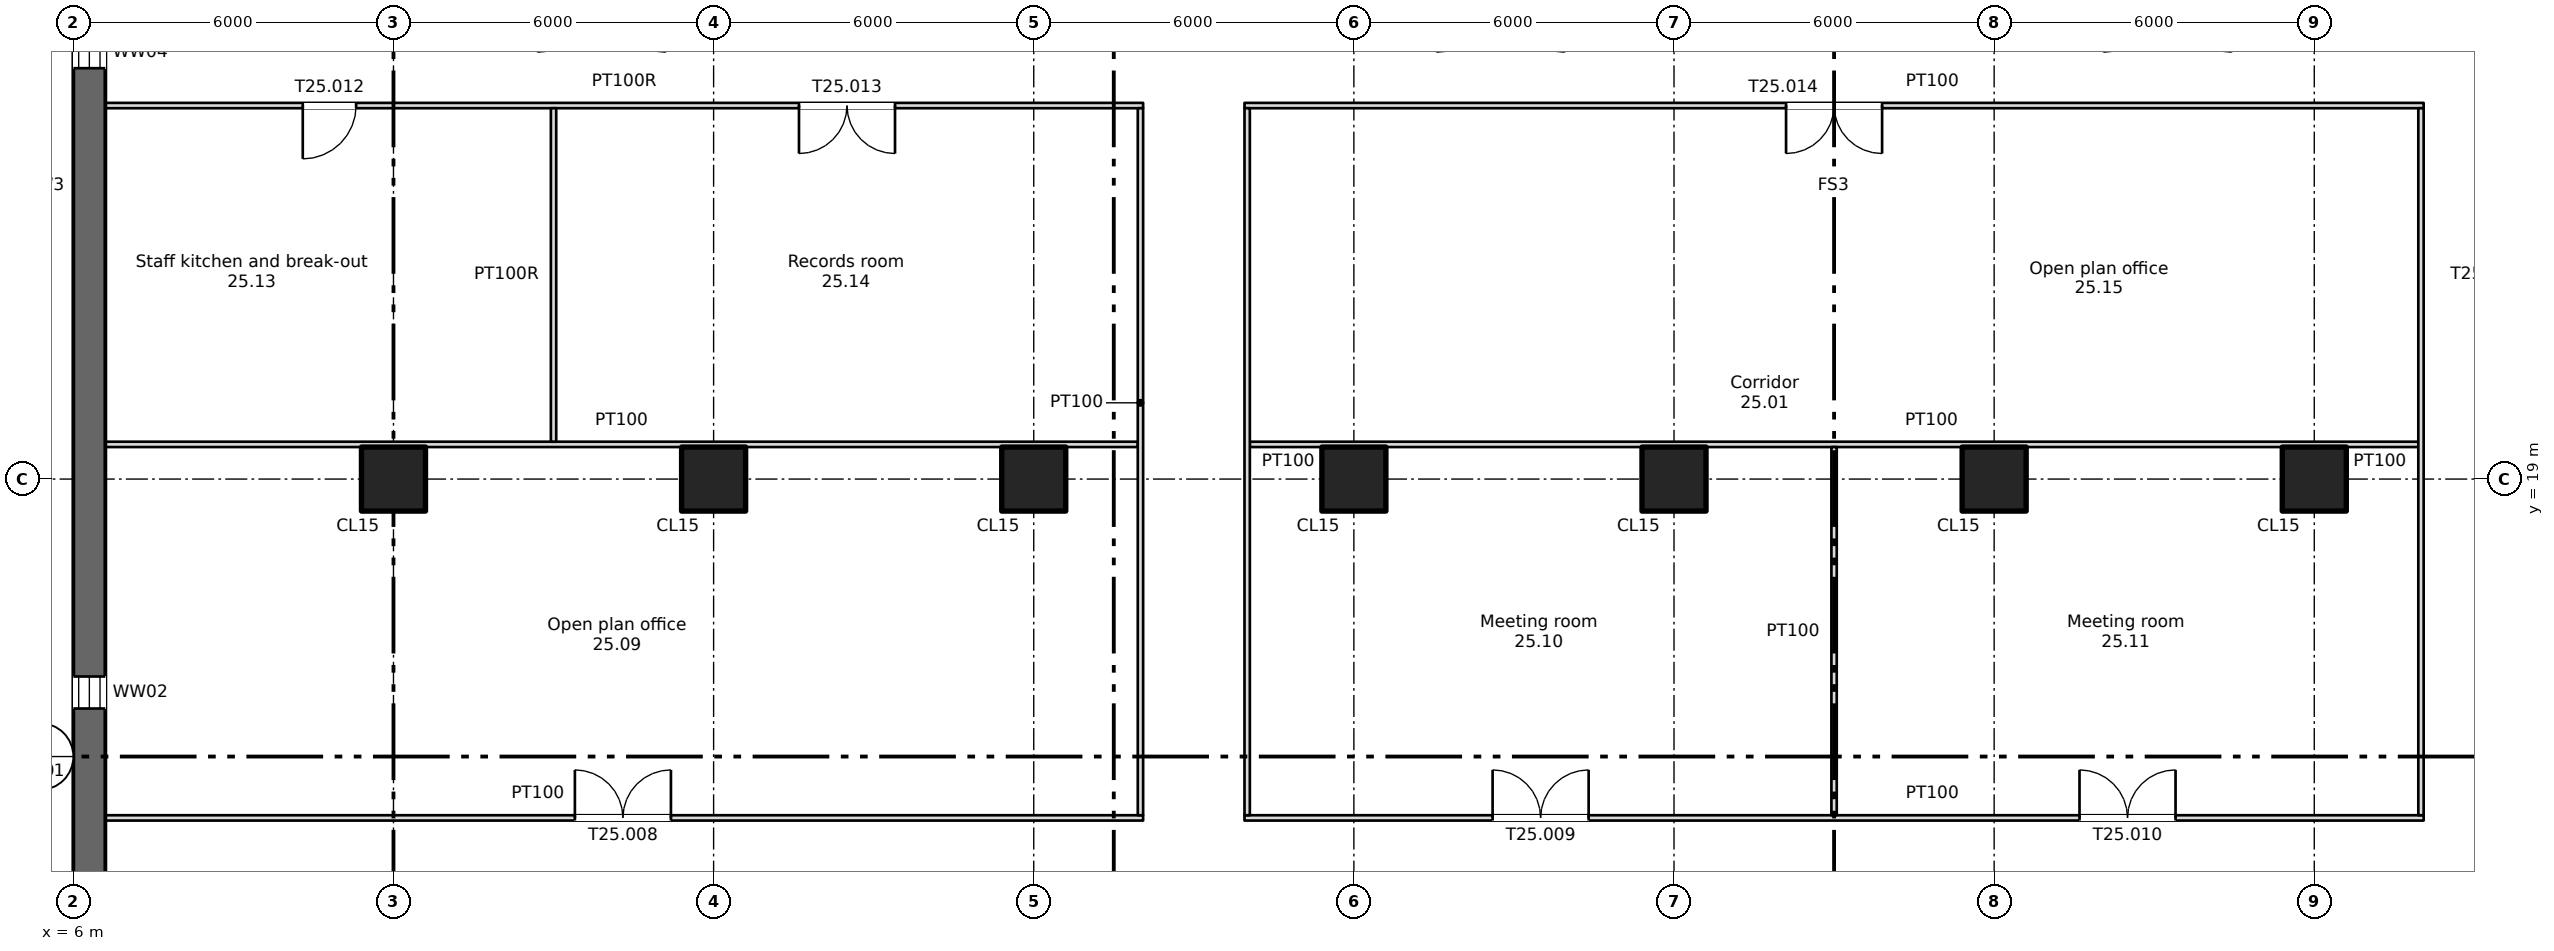
"""IFC4 building model, lengths in metres.
Left out: names, types, materials, properties, quantities, classifications, styles, units other than length and angle.
Written with IfcOpenShell. Run it as: python <this file> out.ifc"""

import sys

from ifc_helpers import new_model, si_unit, direction, frame, frame_2d, origin, origin_2d, place, context, subcontext, project, spatial, rectangle, extrude, element, fill, save


model = new_model("IFC4")
c1 = context("Model", 3, precision=1e-05, world=origin(), true_north=direction((0.0, 1.0)))
c2 = subcontext(c1, "Body", "Model", "MODEL_VIEW")
j1 = project(units=[si_unit("LENGTHUNIT", "METRE"), si_unit("PLANEANGLEUNIT", "RADIAN")], contexts=[c1])
p1 = place(None, origin())
s1 = spatial("IfcSite", under=j1, at=p1, CompositionType="ELEMENT")
p2 = place(p1, origin())
s2 = spatial("IfcBuilding", under=s1, at=p2, CompositionType="ELEMENT")
p3 = place(p2, frame((0.0, 0.0, 170.5)))
s3 = spatial("IfcBuildingStorey", under=s2, at=p3, CompositionType="ELEMENT", Elevation=170.5)
for number, where, z_axis, x_axis in (
    (1, (12.0, 19.0, 0.0), (0.0, 0.0, 1.0), (1.0, 0.0, 0.0)),
    (2, (18.0, 19.0, 0.0), (0.0, 0.0, 1.0), (1.0, 0.0, 0.0)),
    (3, (24.0, 19.0, 0.0), (0.0, 0.0, 1.0), (1.0, 0.0, 0.0)),
    (4, (30.0, 19.0, 0.0), (0.0, 0.0, 1.0), (1.0, 0.0, 0.0)),
    (5, (36.0, 19.0, 0.0), (0.0, 0.0, 1.0), (1.0, 0.0, 0.0)),
    (6, (42.0, 19.0, 0.0), (0.0, 0.0, 1.0), (1.0, 0.0, 0.0)),
    (7, (48.0, 19.0, 0.0), (0.0, 0.0, 1.0), (1.0, 0.0, 0.0)),
):
    element("IfcColumn", number, at=place(p3, frame(where, z_axis=z_axis, x_axis=x_axis)), inside=s3, PredefinedType="COLUMN", context=c2, shape_type="SweptSolid", body=[
        extrude(rectangle(XDim=1.2, YDim=1.2, at=origin_2d()), origin(), (0.0, 0.0, 1.0), 3.35),
    ])
p4 = place(p3, frame((6.3, 7.5, 0.0), z_axis=(0.0, 0.0, 1.0), x_axis=(0.0, 1.0, 0.0)))
e8 = element("IfcWall", 8, at=p4, inside=s3, PredefinedType="SHEAR", context=c2, shape_type="SweptSolid", body=[
    extrude(rectangle(XDim=34.0, YDim=0.6, at=frame_2d((17.0, 0.0))), origin(), (0.0, 0.0, 1.0), 3.35),
])
p5 = place(p4, frame((1.2, 0.0, 0.6)))
e9 = element("IfcOpeningElement", 9, at=p5, cuts=e8, PredefinedType="OPENING", context=c2, shape_type="SweptSolid", body=[
    extrude(rectangle(XDim=0.6, YDim=2.4, at=frame_2d((0.3, 1.2))), frame((0.0, 0.31, 0.0), z_axis=(0.0, -1.0, 0.0), x_axis=(1.0, 0.0, 0.0)), (0.0, 0.0, 1.0), 0.62),
])
p6 = place(p4, frame((7.2, 0.0, 0.6)))
e10 = element("IfcOpeningElement", 10, at=p6, cuts=e8, PredefinedType="OPENING", context=c2, shape_type="SweptSolid", body=[
    extrude(rectangle(XDim=0.6, YDim=2.4, at=frame_2d((0.3, 1.2))), frame((0.0, 0.31, 0.0), z_axis=(0.0, -1.0, 0.0), x_axis=(1.0, 0.0, 0.0)), (0.0, 0.0, 1.0), 0.62),
])
p7 = place(p4, frame((19.2, 0.0, 0.6)))
e11 = element("IfcOpeningElement", 11, at=p7, cuts=e8, PredefinedType="OPENING", context=c2, shape_type="SweptSolid", body=[
    extrude(rectangle(XDim=0.6, YDim=2.4, at=frame_2d((0.3, 1.2))), frame((0.0, 0.31, 0.0), z_axis=(0.0, -1.0, 0.0), x_axis=(1.0, 0.0, 0.0)), (0.0, 0.0, 1.0), 0.62),
])
p8 = place(p3, frame((6.6, 12.65, 0.0), z_axis=(0.0, 0.0, 1.0), x_axis=(1.0, 0.0, 0.0)))
e12 = element("IfcWall", 12, at=p8, inside=s3, PredefinedType="PARTITIONING", context=c2, shape_type="SweptSolid", body=[
    extrude(rectangle(XDim=19.45, YDim=0.1, at=frame_2d((9.725, 0.0))), origin(), (0.0, 0.0, 1.0), 3.35),
])
p9 = place(p8, frame((8.8, 0.0, 0.0)))
e13 = element("IfcOpeningElement", 13, at=p9, cuts=e12, PredefinedType="OPENING", context=c2, shape_type="SweptSolid", body=[
    extrude(rectangle(XDim=1.8, YDim=2.1, at=frame_2d((0.9, 1.05))), frame((0.0, 0.06, 0.0), z_axis=(0.0, -1.0, 0.0), x_axis=(1.0, 0.0, 0.0)), (0.0, 0.0, 1.0), 0.12),
])
p10 = place(p3, frame((27.95, 12.65, 0.0), z_axis=(0.0, 0.0, 1.0), x_axis=(1.0, 0.0, 0.0)))
e14 = element("IfcWall", 14, at=p10, inside=s3, PredefinedType="PARTITIONING", context=c2, shape_type="SweptSolid", body=[
    extrude(rectangle(XDim=22.1, YDim=0.1, at=frame_2d((11.05, 0.0))), origin(), (0.0, 0.0, 1.0), 3.35),
])
p11 = place(p10, frame((4.65, 0.0, 0.0)))
e15 = element("IfcOpeningElement", 15, at=p11, cuts=e14, PredefinedType="OPENING", context=c2, shape_type="SweptSolid", body=[
    extrude(rectangle(XDim=1.8, YDim=2.1, at=frame_2d((0.9, 1.05))), frame((0.0, 0.06, 0.0), z_axis=(0.0, -1.0, 0.0), x_axis=(1.0, 0.0, 0.0)), (0.0, 0.0, 1.0), 0.12),
])
p12 = place(p10, frame((15.65, 0.0, 0.0)))
e16 = element("IfcOpeningElement", 16, at=p12, cuts=e14, PredefinedType="OPENING", context=c2, shape_type="SweptSolid", body=[
    extrude(rectangle(XDim=1.8, YDim=2.1, at=frame_2d((0.9, 1.05))), frame((0.0, 0.06, 0.0), z_axis=(0.0, -1.0, 0.0), x_axis=(1.0, 0.0, 0.0)), (0.0, 0.0, 1.0), 0.12),
])
p13 = place(p3, frame((6.6, 19.65, 0.0), z_axis=(0.0, 0.0, 1.0), x_axis=(1.0, 0.0, 0.0)))
e17 = element("IfcWall", 17, at=p13, inside=s3, PredefinedType="PARTITIONING", context=c2, shape_type="SweptSolid", body=[
    extrude(rectangle(XDim=19.35, YDim=0.1, at=frame_2d((9.675, 0.0))), origin(), (0.0, 0.0, 1.0), 3.35),
])
p14 = place(p3, frame((28.05, 19.65, 0.0), z_axis=(0.0, 0.0, 1.0), x_axis=(1.0, 0.0, 0.0)))
e18 = element("IfcWall", 18, at=p14, inside=s3, PredefinedType="PARTITIONING", context=c2, shape_type="SweptSolid", body=[
    extrude(rectangle(XDim=21.9, YDim=0.1, at=frame_2d((10.95, 0.0))), origin(), (0.0, 0.0, 1.0), 3.35),
])
p15 = place(p3, frame((6.6, 26.0, 0.0), z_axis=(0.0, 0.0, 1.0), x_axis=(1.0, 0.0, 0.0)))
e19 = element("IfcWall", 19, at=p15, inside=s3, PredefinedType="PARTITIONING", context=c2, shape_type="SweptSolid", body=[
    extrude(rectangle(XDim=19.45, YDim=0.1, at=frame_2d((9.725, 0.0))), origin(), (0.0, 0.0, 1.0), 3.35),
])
p16 = place(p15, frame((3.7, 0.0, 0.0)))
e20 = element("IfcOpeningElement", 20, at=p16, cuts=e19, PredefinedType="OPENING", context=c2, shape_type="SweptSolid", body=[
    extrude(rectangle(XDim=1.0, YDim=2.1, at=frame_2d((0.5, 1.05))), frame((0.0, 0.06, 0.0), z_axis=(0.0, -1.0, 0.0), x_axis=(1.0, 0.0, 0.0)), (0.0, 0.0, 1.0), 0.12),
])
p17 = place(p15, frame((13.0, 0.0, 0.0)))
e21 = element("IfcOpeningElement", 21, at=p17, cuts=e19, PredefinedType="OPENING", context=c2, shape_type="SweptSolid", body=[
    extrude(rectangle(XDim=1.8, YDim=2.1, at=frame_2d((0.9, 1.05))), frame((0.0, 0.06, 0.0), z_axis=(0.0, -1.0, 0.0), x_axis=(1.0, 0.0, 0.0)), (0.0, 0.0, 1.0), 0.12),
])
p18 = place(p3, frame((27.95, 26.0, 0.0), z_axis=(0.0, 0.0, 1.0), x_axis=(1.0, 0.0, 0.0)))
e22 = element("IfcWall", 22, at=p18, inside=s3, PredefinedType="PARTITIONING", context=c2, shape_type="SweptSolid", body=[
    extrude(rectangle(XDim=22.1, YDim=0.1, at=frame_2d((11.05, 0.0))), origin(), (0.0, 0.0, 1.0), 3.35),
])
p19 = place(p18, frame((10.15, 0.0, 0.0)))
e23 = element("IfcOpeningElement", 23, at=p19, cuts=e22, PredefinedType="OPENING", context=c2, shape_type="SweptSolid", body=[
    extrude(rectangle(XDim=1.8, YDim=2.1, at=frame_2d((0.9, 1.05))), frame((0.0, 0.06, 0.0), z_axis=(0.0, -1.0, 0.0), x_axis=(1.0, 0.0, 0.0)), (0.0, 0.0, 1.0), 0.12),
])
p20 = place(p3, frame((15.0, 19.7, 0.0), z_axis=(0.0, 0.0, 1.0), x_axis=(0.0, 1.0, 0.0)))
e24 = element("IfcWall", 24, at=p20, inside=s3, PredefinedType="PARTITIONING", context=c2, shape_type="SweptSolid", body=[
    extrude(rectangle(XDim=6.25, YDim=0.1, at=frame_2d((3.125, 0.0))), origin(), (0.0, 0.0, 1.0), 3.35),
])
for number, where, z_axis, x_axis in (
    (25, (26.0, 12.7, 0.0), (0.0, 0.0, 1.0), (0.0, 1.0, 0.0)),
    (26, (28.0, 12.7, 0.0), (0.0, 0.0, 1.0), (0.0, 1.0, 0.0)),
):
    element("IfcWall", number, at=place(p3, frame(where, z_axis=z_axis, x_axis=x_axis)), inside=s3, PredefinedType="PARTITIONING", context=c2, shape_type="SweptSolid", body=[
        extrude(rectangle(XDim=13.25, YDim=0.1, at=frame_2d((6.625, 0.0))), origin(), (0.0, 0.0, 1.0), 3.35),
    ])
p21 = place(p3, frame((39.0, 12.7, 0.0), z_axis=(0.0, 0.0, 1.0), x_axis=(0.0, 1.0, 0.0)))
e27 = element("IfcWall", 27, at=p21, inside=s3, PredefinedType="PARTITIONING", context=c2, shape_type="SweptSolid", body=[
    extrude(rectangle(XDim=6.9, YDim=0.1, at=frame_2d((3.45, 0.0))), origin(), (0.0, 0.0, 1.0), 3.35),
])
p22 = place(p3, frame((50.0, 12.7, 0.0), z_axis=(0.0, 0.0, 1.0), x_axis=(0.0, 1.0, 0.0)))
e28 = element("IfcWall", 28, at=p22, inside=s3, PredefinedType="PARTITIONING", context=c2, shape_type="SweptSolid", body=[
    extrude(rectangle(XDim=13.25, YDim=0.1, at=frame_2d((6.625, 0.0))), origin(), (0.0, 0.0, 1.0), 3.35),
])
p23 = place(p6, origin())
e29 = element("IfcWindow", 29, at=p23, inside=s3, PartitioningType="SINGLE_PANEL", PredefinedType="WINDOW", context=c2, shape_type="SweptSolid", body=[
    extrude(rectangle(XDim=0.6, YDim=2.4, at=frame_2d((0.3, 1.2))), frame((0.0, 0.03, 0.0), z_axis=(0.0, -1.0, 0.0), x_axis=(1.0, 0.0, 0.0)), (0.0, 0.0, 1.0), 0.06),
])
fill(e10, e29)
p24 = place(p7, origin())
e30 = element("IfcWindow", 30, at=p24, inside=s3, PartitioningType="SINGLE_PANEL", PredefinedType="WINDOW", context=c2, shape_type="SweptSolid", body=[
    extrude(rectangle(XDim=0.6, YDim=2.4, at=frame_2d((0.3, 1.2))), frame((0.0, 0.03, 0.0), z_axis=(0.0, -1.0, 0.0), x_axis=(1.0, 0.0, 0.0)), (0.0, 0.0, 1.0), 0.06),
])
fill(e11, e30)
p25 = place(p9, origin())
e31 = element("IfcDoor", 31, at=p25, inside=s3, OperationType="DOUBLE_DOOR_SINGLE_SWING", PredefinedType="DOOR", context=c2, shape_type="SweptSolid", body=[
    extrude(rectangle(XDim=1.8, YDim=2.1, at=frame_2d((0.9, 1.05))), frame((0.0, 0.025, 0.0), z_axis=(0.0, -1.0, 0.0), x_axis=(1.0, 0.0, 0.0)), (0.0, 0.0, 1.0), 0.05),
])
fill(e13, e31)
p26 = place(p11, origin())
e32 = element("IfcDoor", 32, at=p26, inside=s3, OperationType="DOUBLE_DOOR_SINGLE_SWING", PredefinedType="DOOR", context=c2, shape_type="SweptSolid", body=[
    extrude(rectangle(XDim=1.8, YDim=2.1, at=frame_2d((0.9, 1.05))), frame((0.0, 0.025, 0.0), z_axis=(0.0, -1.0, 0.0), x_axis=(1.0, 0.0, 0.0)), (0.0, 0.0, 1.0), 0.05),
])
fill(e15, e32)
p27 = place(p12, origin())
e33 = element("IfcDoor", 33, at=p27, inside=s3, OperationType="DOUBLE_DOOR_SINGLE_SWING", PredefinedType="DOOR", context=c2, shape_type="SweptSolid", body=[
    extrude(rectangle(XDim=1.8, YDim=2.1, at=frame_2d((0.9, 1.05))), frame((0.0, 0.025, 0.0), z_axis=(0.0, -1.0, 0.0), x_axis=(1.0, 0.0, 0.0)), (0.0, 0.0, 1.0), 0.05),
])
fill(e16, e33)
p28 = place(p16, origin())
e34 = element("IfcDoor", 34, at=p28, inside=s3, OperationType="SINGLE_SWING_LEFT", PredefinedType="DOOR", context=c2, shape_type="SweptSolid", body=[
    extrude(rectangle(XDim=1.0, YDim=2.1, at=frame_2d((0.5, 1.05))), frame((0.0, 0.025, 0.0), z_axis=(0.0, -1.0, 0.0), x_axis=(1.0, 0.0, 0.0)), (0.0, 0.0, 1.0), 0.05),
])
fill(e20, e34)
p29 = place(p17, origin())
e35 = element("IfcDoor", 35, at=p29, inside=s3, OperationType="DOUBLE_DOOR_SINGLE_SWING", PredefinedType="DOOR", context=c2, shape_type="SweptSolid", body=[
    extrude(rectangle(XDim=1.8, YDim=2.1, at=frame_2d((0.9, 1.05))), frame((0.0, 0.025, 0.0), z_axis=(0.0, -1.0, 0.0), x_axis=(1.0, 0.0, 0.0)), (0.0, 0.0, 1.0), 0.05),
])
fill(e21, e35)
p30 = place(p19, origin())
e36 = element("IfcDoor", 36, at=p30, inside=s3, OperationType="DOUBLE_DOOR_SINGLE_SWING", PredefinedType="DOOR", context=c2, shape_type="SweptSolid", body=[
    extrude(rectangle(XDim=1.8, YDim=2.1, at=frame_2d((0.9, 1.05))), frame((0.0, 0.025, 0.0), z_axis=(0.0, -1.0, 0.0), x_axis=(1.0, 0.0, 0.0)), (0.0, 0.0, 1.0), 0.05),
])
fill(e23, e36)
save(model, sys.argv[1])
